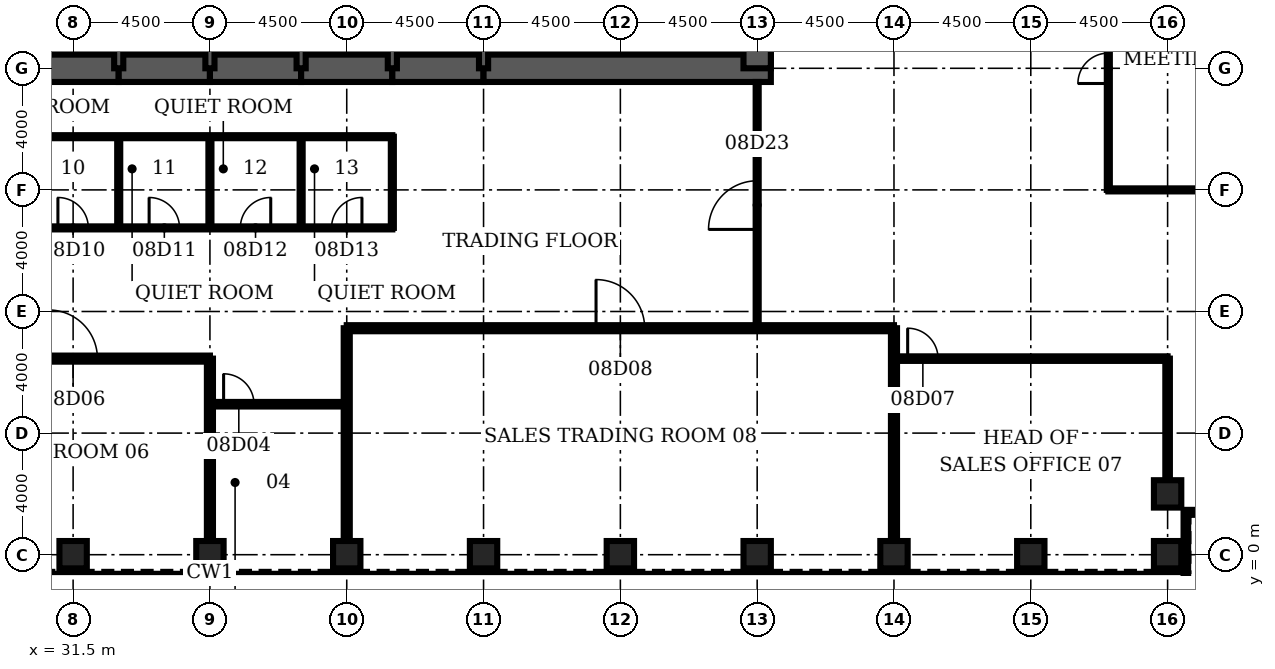
"""IFC4 building model, lengths in metres.
Left out: names, types, materials, properties, quantities, classifications, styles, units other than length and angle.
Written with IfcOpenShell. Run it as: python <this file> out.ifc"""

import sys

from ifc_helpers import new_model, si_unit, direction, frame, frame_2d, origin, origin_2d, place, context, subcontext, project, spatial, rectangle, hollow_rectangle, extrude, element, fill, save


model = new_model("IFC4")
c1 = context("Model", 3, precision=1e-05, world=origin(), true_north=direction((0.0, 1.0)))
c2 = subcontext(c1, "Body", "Model", "MODEL_VIEW")
j1 = project(units=[si_unit("LENGTHUNIT", "METRE"), si_unit("PLANEANGLEUNIT", "RADIAN")], contexts=[c1])
p1 = place(None, origin())
s1 = spatial("IfcSite", under=j1, at=p1, CompositionType="ELEMENT")
p2 = place(p1, origin())
s2 = spatial("IfcBuilding", under=s1, at=p2, CompositionType="ELEMENT")
p3 = place(p2, frame((0.0, 0.0, 41.0)))
s3 = spatial("IfcBuildingStorey", under=s2, at=p3, CompositionType="ELEMENT", Elevation=41.0)
for number, where, z_axis, x_axis in (
    (1, (31.5, 0.0, 0.0), (0.0, 0.0, 1.0), (0.0, 1.0, 0.0)),
    (2, (36.0, 0.0, 0.0), (0.0, 0.0, 1.0), (0.0, 1.0, 0.0)),
    (3, (40.5, 0.0, 0.0), (0.0, 0.0, 1.0), (0.0, 1.0, 0.0)),
    (4, (45.0, 0.0, 0.0), (0.0, 0.0, 1.0), (0.0, 1.0, 0.0)),
    (5, (49.5, 0.0, 0.0), (0.0, 0.0, 1.0), (0.0, 1.0, 0.0)),
    (6, (54.0, 0.0, 0.0), (0.0, 0.0, 1.0), (0.0, 1.0, 0.0)),
    (7, (58.5, 0.0, 0.0), (0.0, 0.0, 1.0), (0.0, 1.0, 0.0)),
    (8, (63.0, 0.0, 0.0), (0.0, 0.0, 1.0), (0.0, 1.0, 0.0)),
    (9, (67.5, 0.0, 0.0), (0.0, 0.0, 1.0), (0.0, 1.0, 0.0)),
    (10, (67.5, 2.0, 0.0), (0.0, 0.0, 1.0), (0.0, 1.0, 0.0)),
):
    element("IfcColumn", number, at=place(p3, frame(where, z_axis=z_axis, x_axis=x_axis)), inside=s3, PredefinedType="COLUMN", context=c2, shape_type="SweptSolid", body=[
        extrude(hollow_rectangle(XDim=0.9, YDim=0.9, WallThickness=0.12, at=origin_2d()), origin(), (0.0, 0.0, 1.0), 4.5),
    ])
for number, where, z_axis, x_axis in (
    (11, (30.0, 16.0, 0.0), (0.0, 0.0, 1.0), (1.0, 0.0, 0.0)),
    (12, (33.0, 16.0, 0.0), (0.0, 0.0, 1.0), (1.0, 0.0, 0.0)),
    (13, (36.0, 16.0, 0.0), (0.0, 0.0, 1.0), (1.0, 0.0, 0.0)),
    (14, (39.0, 16.0, 0.0), (0.0, 0.0, 1.0), (1.0, 0.0, 0.0)),
    (15, (42.0, 16.0, 0.0), (0.0, 0.0, 1.0), (1.0, 0.0, 0.0)),
):
    element("IfcWall", number, at=place(p3, frame(where, z_axis=z_axis, x_axis=x_axis)), inside=s3, PredefinedType="SHEAR", context=c2, shape_type="SweptSolid", body=[
        extrude(rectangle(XDim=3.0, YDim=0.9, at=frame_2d((1.5, 0.0))), origin(), (0.0, 0.0, 1.0), 4.5),
    ])
p4 = place(p3, frame((45.0, 16.0, 0.0), z_axis=(0.0, 0.0, 1.0), x_axis=(1.0, 0.0, 0.0)))
e16 = element("IfcWall", 16, at=p4, inside=s3, PredefinedType="SHEAR", context=c2, shape_type="SweptSolid", body=[
    extrude(rectangle(XDim=9.45, YDim=0.9, at=frame_2d((4.725, 0.0))), origin(), (0.0, 0.0, 1.0), 4.5),
])
p5 = place(p3, frame((54.0, 16.0, 0.0), z_axis=(0.0, 0.0, 1.0), x_axis=(0.0, 1.0, 0.0)))
e17 = element("IfcWall", 17, at=p5, inside=s3, PredefinedType="SHEAR", context=c2, shape_type="SweptSolid", body=[
    extrude(rectangle(XDim=3.2, YDim=0.9, at=frame_2d((1.6, 0.0))), origin(), (0.0, 0.0, 1.0), 4.5),
])
for number, where, z_axis, x_axis in (
    (18, (33.0, 16.0, 0.0), (0.0, 0.0, 1.0), (0.0, 1.0, 0.0)),
    (19, (36.0, 16.0, 0.0), (0.0, 0.0, 1.0), (0.0, 1.0, 0.0)),
    (20, (39.0, 16.0, 0.0), (0.0, 0.0, 1.0), (0.0, 1.0, 0.0)),
    (21, (42.0, 16.0, 0.0), (0.0, 0.0, 1.0), (0.0, 1.0, 0.0)),
    (22, (45.0, 16.0, 0.0), (0.0, 0.0, 1.0), (0.0, 1.0, 0.0)),
):
    element("IfcWall", number, at=place(p3, frame(where, z_axis=z_axis, x_axis=x_axis)), inside=s3, PredefinedType="SOLIDWALL", context=c2, shape_type="SweptSolid", body=[
        extrude(rectangle(XDim=3.2, YDim=0.3, at=frame_2d((1.6, 0.0))), origin(), (0.0, 0.0, 1.0), 4.5),
    ])
p6 = place(p3, frame((36.0, 4.95, 0.0), z_axis=(0.0, 0.0, 1.0), x_axis=(1.0, 0.0, 0.0)))
e23 = element("IfcWall", 23, at=p6, inside=s3, PredefinedType="PARTITIONING", context=c2, shape_type="SweptSolid", body=[
    extrude(rectangle(XDim=4.5, YDim=0.15, at=frame_2d((2.25, 0.0))), origin(), (0.0, 0.0, 1.0), 3.0),
])
p7 = place(p6, frame((0.45, 0.0, 0.0)))
e24 = element("IfcOpeningElement", 24, at=p7, cuts=e23, PredefinedType="OPENING", context=c2, shape_type="SweptSolid", body=[
    extrude(rectangle(XDim=1.0, YDim=2.1, at=frame_2d((0.5, 1.05))), frame((0.0, 0.085, 0.0), z_axis=(0.0, -1.0, 0.0), x_axis=(1.0, 0.0, 0.0)), (0.0, 0.0, 1.0), 0.17),
])
p8 = place(p3, frame((27.0, 6.45, 0.0), z_axis=(0.0, 0.0, 1.0), x_axis=(1.0, 0.0, 0.0)))
e25 = element("IfcWall", 25, at=p8, inside=s3, PredefinedType="PARTITIONING", context=c2, shape_type="SweptSolid", body=[
    extrude(rectangle(XDim=9.0, YDim=0.2, at=frame_2d((4.5, 0.0))), origin(), (0.0, 0.0, 1.0), 3.0),
])
p9 = place(p8, frame((3.7, 0.0, 0.0)))
e26 = element("IfcOpeningElement", 26, at=p9, cuts=e25, PredefinedType="OPENING", context=c2, shape_type="SweptSolid", body=[
    extrude(rectangle(XDim=1.6, YDim=2.1, at=frame_2d((0.8, 1.05))), frame((0.0, 0.11, 0.0), z_axis=(0.0, -1.0, 0.0), x_axis=(1.0, 0.0, 0.0)), (0.0, 0.0, 1.0), 0.22),
])
p10 = place(p3, frame((58.5, 6.45, 0.0), z_axis=(0.0, 0.0, 1.0), x_axis=(1.0, 0.0, 0.0)))
e27 = element("IfcWall", 27, at=p10, inside=s3, PredefinedType="PARTITIONING", context=c2, shape_type="SweptSolid", body=[
    extrude(rectangle(XDim=9.0, YDim=0.15, at=frame_2d((4.5, 0.0))), origin(), (0.0, 0.0, 1.0), 3.0),
])
p11 = place(p10, frame((0.45, 0.0, 0.0)))
e28 = element("IfcOpeningElement", 28, at=p11, cuts=e27, PredefinedType="OPENING", context=c2, shape_type="SweptSolid", body=[
    extrude(rectangle(XDim=1.0, YDim=2.1, at=frame_2d((0.5, 1.05))), frame((0.0, 0.085, 0.0), z_axis=(0.0, -1.0, 0.0), x_axis=(1.0, 0.0, 0.0)), (0.0, 0.0, 1.0), 0.17),
])
p12 = place(p3, frame((40.5, 7.45, 0.0), z_axis=(0.0, 0.0, 1.0), x_axis=(1.0, 0.0, 0.0)))
e29 = element("IfcWall", 29, at=p12, inside=s3, PredefinedType="PARTITIONING", context=c2, shape_type="SweptSolid", body=[
    extrude(rectangle(XDim=18.0, YDim=0.2, at=frame_2d((9.0, 0.0))), origin(), (0.0, 0.0, 1.0), 3.0),
])
p13 = place(p12, frame((8.2, 0.0, 0.0)))
e30 = element("IfcOpeningElement", 30, at=p13, cuts=e29, PredefinedType="OPENING", context=c2, shape_type="SweptSolid", body=[
    extrude(rectangle(XDim=1.6, YDim=2.1, at=frame_2d((0.8, 1.05))), frame((0.0, 0.11, 0.0), z_axis=(0.0, -1.0, 0.0), x_axis=(1.0, 0.0, 0.0)), (0.0, 0.0, 1.0), 0.22),
])
p14 = place(p3, frame((30.0, 10.75, 0.0), z_axis=(0.0, 0.0, 1.0), x_axis=(1.0, 0.0, 0.0)))
e31 = element("IfcWall", 31, at=p14, inside=s3, PredefinedType="PARTITIONING", context=c2, shape_type="SweptSolid", body=[
    extrude(rectangle(XDim=12.0, YDim=0.1, at=frame_2d((6.0, 0.0))), origin(), (0.0, 0.0, 1.0), 3.0),
])
p15 = place(p14, frame((1.0, 0.0, 0.0)))
e32 = element("IfcOpeningElement", 32, at=p15, cuts=e31, PredefinedType="OPENING", context=c2, shape_type="SweptSolid", body=[
    extrude(rectangle(XDim=1.0, YDim=2.1, at=frame_2d((0.5, 1.05))), frame((0.0, 0.06, 0.0), z_axis=(0.0, -1.0, 0.0), x_axis=(1.0, 0.0, 0.0)), (0.0, 0.0, 1.0), 0.12),
])
p16 = place(p14, frame((4.0, 0.0, 0.0)))
e33 = element("IfcOpeningElement", 33, at=p16, cuts=e31, PredefinedType="OPENING", context=c2, shape_type="SweptSolid", body=[
    extrude(rectangle(XDim=1.0, YDim=2.1, at=frame_2d((0.5, 1.05))), frame((0.0, 0.06, 0.0), z_axis=(0.0, -1.0, 0.0), x_axis=(1.0, 0.0, 0.0)), (0.0, 0.0, 1.0), 0.12),
])
p17 = place(p14, frame((7.0, 0.0, 0.0)))
e34 = element("IfcOpeningElement", 34, at=p17, cuts=e31, PredefinedType="OPENING", context=c2, shape_type="SweptSolid", body=[
    extrude(rectangle(XDim=1.0, YDim=2.1, at=frame_2d((0.5, 1.05))), frame((0.0, 0.06, 0.0), z_axis=(0.0, -1.0, 0.0), x_axis=(1.0, 0.0, 0.0)), (0.0, 0.0, 1.0), 0.12),
])
p18 = place(p14, frame((10.0, 0.0, 0.0)))
e35 = element("IfcOpeningElement", 35, at=p18, cuts=e31, PredefinedType="OPENING", context=c2, shape_type="SweptSolid", body=[
    extrude(rectangle(XDim=1.0, YDim=2.1, at=frame_2d((0.5, 1.05))), frame((0.0, 0.06, 0.0), z_axis=(0.0, -1.0, 0.0), x_axis=(1.0, 0.0, 0.0)), (0.0, 0.0, 1.0), 0.12),
])
p19 = place(p3, frame((65.55, 12.0, 0.0), z_axis=(0.0, 0.0, 1.0), x_axis=(1.0, 0.0, 0.0)))
e36 = element("IfcWall", 36, at=p19, inside=s3, PredefinedType="PARTITIONING", context=c2, shape_type="SweptSolid", body=[
    extrude(rectangle(XDim=6.0, YDim=0.1, at=frame_2d((3.0, 0.0))), origin(), (0.0, 0.0, 1.0), 3.0),
])
p20 = place(p3, frame((30.0, 13.75, 0.0), z_axis=(0.0, 0.0, 1.0), x_axis=(1.0, 0.0, 0.0)))
e37 = element("IfcWall", 37, at=p20, inside=s3, PredefinedType="PARTITIONING", context=c2, shape_type="SweptSolid", body=[
    extrude(rectangle(XDim=12.0, YDim=0.1, at=frame_2d((6.0, 0.0))), origin(), (0.0, 0.0, 1.0), 3.0),
])
p21 = place(p3, frame((33.0, 10.75, 0.0), z_axis=(0.0, 0.0, 1.0), x_axis=(0.0, 1.0, 0.0)))
e38 = element("IfcWall", 38, at=p21, inside=s3, PredefinedType="PARTITIONING", context=c2, shape_type="SweptSolid", body=[
    extrude(rectangle(XDim=3.0, YDim=0.1, at=frame_2d((1.5, 0.0))), origin(), (0.0, 0.0, 1.0), 3.0),
])
p22 = place(p3, frame((36.0, 0.45, 0.0), z_axis=(0.0, 0.0, 1.0), x_axis=(0.0, 1.0, 0.0)))
e39 = element("IfcWall", 39, at=p22, inside=s3, PredefinedType="PARTITIONING", context=c2, shape_type="SweptSolid", body=[
    extrude(rectangle(XDim=6.0, YDim=0.2, at=frame_2d((3.0, 0.0))), origin(), (0.0, 0.0, 1.0), 3.0),
])
for number, where, z_axis, x_axis in (
    (40, (36.0, 10.75, 0.0), (0.0, 0.0, 1.0), (0.0, 1.0, 0.0)),
    (41, (39.0, 10.75, 0.0), (0.0, 0.0, 1.0), (0.0, 1.0, 0.0)),
):
    element("IfcWall", number, at=place(p3, frame(where, z_axis=z_axis, x_axis=x_axis)), inside=s3, PredefinedType="PARTITIONING", context=c2, shape_type="SweptSolid", body=[
        extrude(rectangle(XDim=3.0, YDim=0.1, at=frame_2d((1.5, 0.0))), origin(), (0.0, 0.0, 1.0), 3.0),
    ])
p23 = place(p3, frame((40.5, 0.45, 0.0), z_axis=(0.0, 0.0, 1.0), x_axis=(0.0, 1.0, 0.0)))
e42 = element("IfcWall", 42, at=p23, inside=s3, PredefinedType="PARTITIONING", context=c2, shape_type="SweptSolid", body=[
    extrude(rectangle(XDim=7.0, YDim=0.2, at=frame_2d((3.5, 0.0))), origin(), (0.0, 0.0, 1.0), 3.0),
])
p24 = place(p3, frame((42.0, 10.75, 0.0), z_axis=(0.0, 0.0, 1.0), x_axis=(0.0, 1.0, 0.0)))
e43 = element("IfcWall", 43, at=p24, inside=s3, PredefinedType="PARTITIONING", context=c2, shape_type="SweptSolid", body=[
    extrude(rectangle(XDim=3.0, YDim=0.1, at=frame_2d((1.5, 0.0))), origin(), (0.0, 0.0, 1.0), 3.0),
])
p25 = place(p3, frame((54.0, 7.45, 0.0), z_axis=(0.0, 0.0, 1.0), x_axis=(0.0, 1.0, 0.0)))
e44 = element("IfcWall", 44, at=p25, inside=s3, PredefinedType="PARTITIONING", context=c2, shape_type="SweptSolid", body=[
    extrude(rectangle(XDim=8.1, YDim=0.1, at=frame_2d((4.05, 0.0))), origin(), (0.0, 0.0, 1.0), 3.0),
])
p26 = place(p25, frame((3.25, 0.0, 0.0)))
e45 = element("IfcOpeningElement", 45, at=p26, cuts=e44, PredefinedType="OPENING", context=c2, shape_type="SweptSolid", body=[
    extrude(rectangle(XDim=1.6, YDim=2.1, at=frame_2d((0.8, 1.05))), frame((0.0, 0.06, 0.0), z_axis=(0.0, -1.0, 0.0), x_axis=(1.0, 0.0, 0.0)), (0.0, 0.0, 1.0), 0.12),
])
p27 = place(p3, frame((58.5, 0.45, 0.0), z_axis=(0.0, 0.0, 1.0), x_axis=(0.0, 1.0, 0.0)))
e46 = element("IfcWall", 46, at=p27, inside=s3, PredefinedType="PARTITIONING", context=c2, shape_type="SweptSolid", body=[
    extrude(rectangle(XDim=7.0, YDim=0.2, at=frame_2d((3.5, 0.0))), origin(), (0.0, 0.0, 1.0), 3.0),
])
p28 = place(p3, frame((65.55, 12.0, 0.0), z_axis=(0.0, 0.0, 1.0), x_axis=(0.0, 1.0, 0.0)))
e47 = element("IfcWall", 47, at=p28, inside=s3, PredefinedType="PARTITIONING", context=c2, shape_type="SweptSolid", body=[
    extrude(rectangle(XDim=8.0, YDim=0.1, at=frame_2d((4.0, 0.0))), origin(), (0.0, 0.0, 1.0), 3.0),
])
p29 = place(p28, frame((3.5, 0.0, 0.0)))
e48 = element("IfcOpeningElement", 48, at=p29, cuts=e47, PredefinedType="OPENING", context=c2, shape_type="SweptSolid", body=[
    extrude(rectangle(XDim=1.0, YDim=2.1, at=frame_2d((0.5, 1.05))), frame((0.0, 0.06, 0.0), z_axis=(0.0, -1.0, 0.0), x_axis=(1.0, 0.0, 0.0)), (0.0, 0.0, 1.0), 0.12),
])
p30 = place(p3, frame((67.5, 2.45, 0.0), z_axis=(0.0, 0.0, 1.0), x_axis=(0.0, 1.0, 0.0)))
e49 = element("IfcWall", 49, at=p30, inside=s3, PredefinedType="PARTITIONING", context=c2, shape_type="SweptSolid", body=[
    extrude(rectangle(XDim=4.0, YDim=0.15, at=frame_2d((2.0, 0.0))), origin(), (0.0, 0.0, 1.0), 3.0),
])
p31 = place(p3, frame((68.1, -0.6, 0.0), z_axis=(0.0, 0.0, 1.0), x_axis=(0.0, 1.0, 0.0)))
e50 = element("IfcWall", 50, at=p31, inside=s3, PredefinedType="ELEMENTEDWALL", context=c2, shape_type="SweptSolid", body=[
    extrude(rectangle(XDim=2.0, YDim=0.15, at=frame_2d((1.0, 0.0))), origin(), (0.0, 0.0, 1.0), 4.32),
])
p32 = place(p3, frame((68.1, 1.4, 0.0), z_axis=(0.0, 0.0, 1.0), x_axis=(1.0, 0.0, 0.0)))
e51 = element("IfcWall", 51, at=p32, inside=s3, PredefinedType="ELEMENTEDWALL", context=c2, shape_type="SweptSolid", body=[
    extrude(rectangle(XDim=2.25, YDim=0.15, at=frame_2d((1.125, 0.0))), origin(), (0.0, 0.0, 1.0), 4.32),
])
p33 = place(p7, origin())
e52 = element("IfcDoor", 52, at=p33, inside=s3, OperationType="SINGLE_SWING_LEFT", PredefinedType="DOOR", context=c2, shape_type="SweptSolid", body=[
    extrude(rectangle(XDim=1.0, YDim=2.1, at=frame_2d((0.5, 1.05))), frame((0.0, 0.025, 0.0), z_axis=(0.0, -1.0, 0.0), x_axis=(1.0, 0.0, 0.0)), (0.0, 0.0, 1.0), 0.05),
])
fill(e24, e52)
p34 = place(p9, origin())
e53 = element("IfcDoor", 53, at=p34, inside=s3, OperationType="SINGLE_SWING_LEFT", PredefinedType="DOOR", context=c2, shape_type="SweptSolid", body=[
    extrude(rectangle(XDim=1.6, YDim=2.1, at=frame_2d((0.8, 1.05))), frame((0.0, 0.025, 0.0), z_axis=(0.0, -1.0, 0.0), x_axis=(1.0, 0.0, 0.0)), (0.0, 0.0, 1.0), 0.05),
])
fill(e26, e53)
p35 = place(p11, origin())
e54 = element("IfcDoor", 54, at=p35, inside=s3, OperationType="SINGLE_SWING_LEFT", PredefinedType="DOOR", context=c2, shape_type="SweptSolid", body=[
    extrude(rectangle(XDim=1.0, YDim=2.1, at=frame_2d((0.5, 1.05))), frame((0.0, 0.025, 0.0), z_axis=(0.0, -1.0, 0.0), x_axis=(1.0, 0.0, 0.0)), (0.0, 0.0, 1.0), 0.05),
])
fill(e28, e54)
p36 = place(p13, origin())
e55 = element("IfcDoor", 55, at=p36, inside=s3, OperationType="SINGLE_SWING_LEFT", PredefinedType="DOOR", context=c2, shape_type="SweptSolid", body=[
    extrude(rectangle(XDim=1.6, YDim=2.1, at=frame_2d((0.8, 1.05))), frame((0.0, 0.025, 0.0), z_axis=(0.0, -1.0, 0.0), x_axis=(1.0, 0.0, 0.0)), (0.0, 0.0, 1.0), 0.05),
])
fill(e30, e55)
p37 = place(p15, origin())
e56 = element("IfcDoor", 56, at=p37, inside=s3, OperationType="SINGLE_SWING_LEFT", PredefinedType="DOOR", context=c2, shape_type="SweptSolid", body=[
    extrude(rectangle(XDim=1.0, YDim=2.1, at=frame_2d((0.5, 1.05))), frame((0.0, 0.025, 0.0), z_axis=(0.0, -1.0, 0.0), x_axis=(1.0, 0.0, 0.0)), (0.0, 0.0, 1.0), 0.05),
])
fill(e32, e56)
p38 = place(p16, origin())
e57 = element("IfcDoor", 57, at=p38, inside=s3, OperationType="SINGLE_SWING_LEFT", PredefinedType="DOOR", context=c2, shape_type="SweptSolid", body=[
    extrude(rectangle(XDim=1.0, YDim=2.1, at=frame_2d((0.5, 1.05))), frame((0.0, 0.025, 0.0), z_axis=(0.0, -1.0, 0.0), x_axis=(1.0, 0.0, 0.0)), (0.0, 0.0, 1.0), 0.05),
])
fill(e33, e57)
p39 = place(p17, origin())
e58 = element("IfcDoor", 58, at=p39, inside=s3, OperationType="SINGLE_SWING_RIGHT", PredefinedType="DOOR", context=c2, shape_type="SweptSolid", body=[
    extrude(rectangle(XDim=1.0, YDim=2.1, at=frame_2d((0.5, 1.05))), frame((0.0, 0.025, 0.0), z_axis=(0.0, -1.0, 0.0), x_axis=(1.0, 0.0, 0.0)), (0.0, 0.0, 1.0), 0.05),
])
fill(e34, e58)
p40 = place(p18, origin())
e59 = element("IfcDoor", 59, at=p40, inside=s3, OperationType="SINGLE_SWING_RIGHT", PredefinedType="DOOR", context=c2, shape_type="SweptSolid", body=[
    extrude(rectangle(XDim=1.0, YDim=2.1, at=frame_2d((0.5, 1.05))), frame((0.0, 0.025, 0.0), z_axis=(0.0, -1.0, 0.0), x_axis=(1.0, 0.0, 0.0)), (0.0, 0.0, 1.0), 0.05),
])
fill(e35, e59)
p41 = place(p29, origin())
e60 = element("IfcDoor", 60, at=p41, inside=s3, OperationType="SINGLE_SWING_LEFT", PredefinedType="DOOR", context=c2, shape_type="SweptSolid", body=[
    extrude(rectangle(XDim=1.0, YDim=2.1, at=frame_2d((0.5, 1.05))), frame((0.0, 0.025, 0.0), z_axis=(0.0, -1.0, 0.0), x_axis=(1.0, 0.0, 0.0)), (0.0, 0.0, 1.0), 0.05),
])
fill(e48, e60)
p42 = place(p26, origin())
e61 = element("IfcDoor", 61, at=p42, inside=s3, OperationType="SINGLE_SWING_LEFT", PredefinedType="DOOR", context=c2, shape_type="SweptSolid", body=[
    extrude(rectangle(XDim=1.6, YDim=2.1, at=frame_2d((0.8, 1.05))), frame((0.0, 0.025, 0.0), z_axis=(0.0, -1.0, 0.0), x_axis=(1.0, 0.0, 0.0)), (0.0, 0.0, 1.0), 0.05),
])
fill(e45, e61)
save(model, sys.argv[1])
